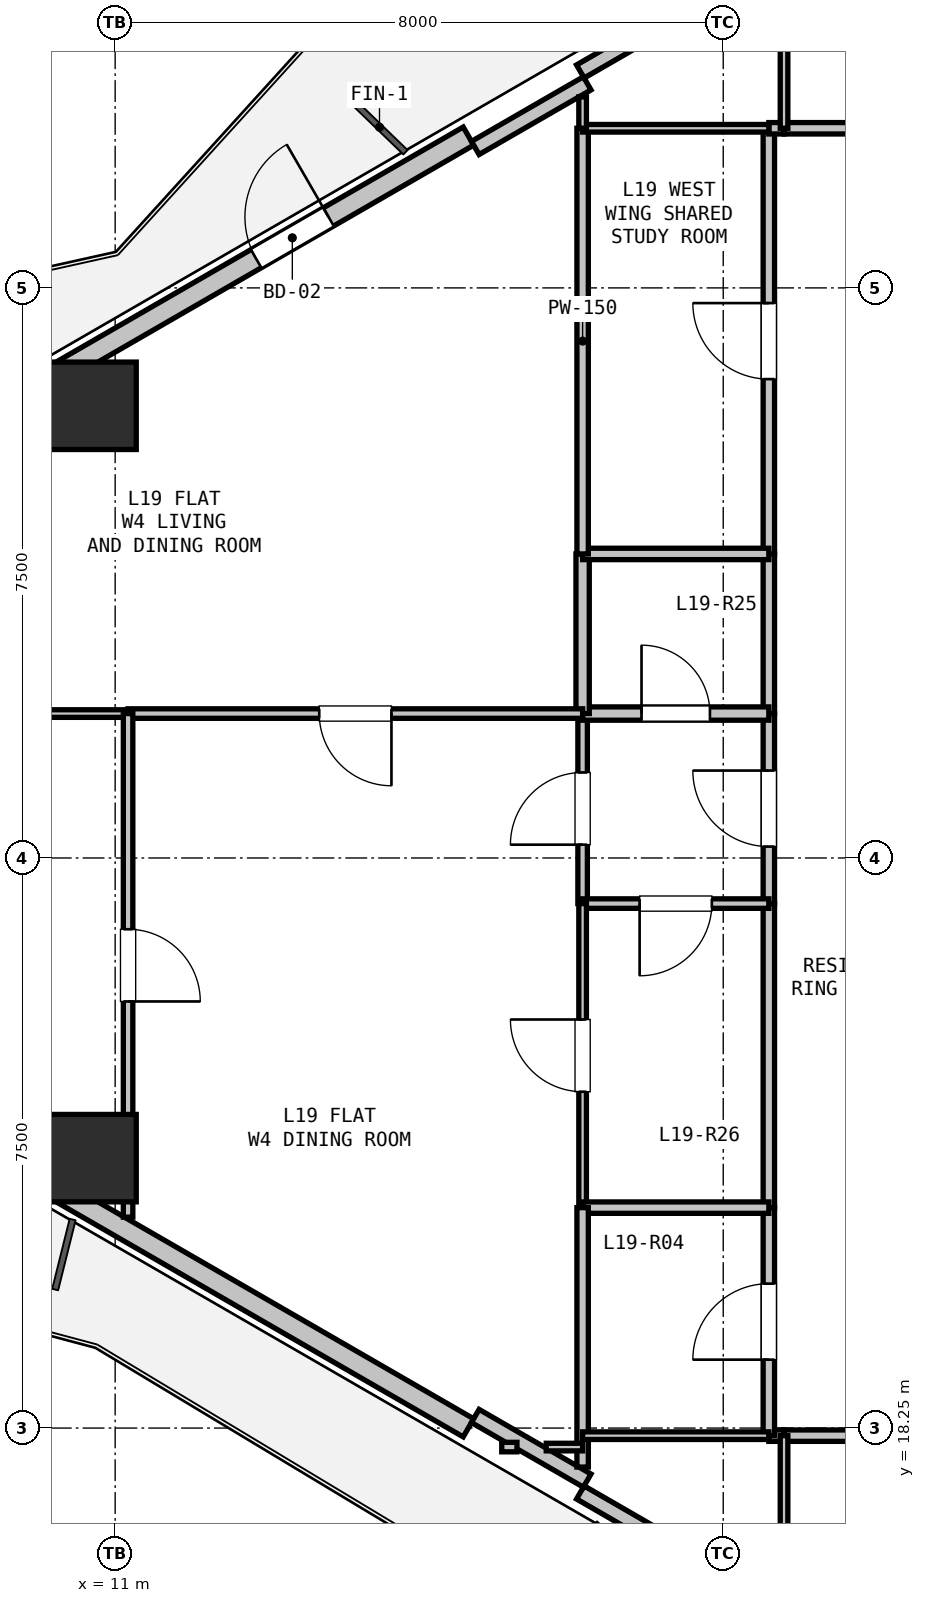
"""IFC4 building model, lengths in metres.
Left out: names, types, materials, properties, quantities, classifications, styles, units other than length and angle.
Written with IfcOpenShell. Run it as: python <this file> out.ifc"""

import sys

from ifc_helpers import new_model, si_unit, direction, frame, frame_2d, origin, origin_2d, place, context, subcontext, project, spatial, rectangle, hollow_rectangle, extrude, element, fill, save


model = new_model("IFC4")
c1 = context("Model", 3, precision=1e-05, world=origin(), true_north=direction((0.0, 1.0)))
c2 = subcontext(c1, "Body", "Model", "MODEL_VIEW")
j1 = project(units=[si_unit("LENGTHUNIT", "METRE"), si_unit("PLANEANGLEUNIT", "RADIAN")], contexts=[c1])
p1 = place(None, origin())
s1 = spatial("IfcSite", under=j1, at=p1, CompositionType="ELEMENT")
p2 = place(p1, origin())
s2 = spatial("IfcBuilding", under=s1, at=p2, CompositionType="ELEMENT")
p3 = place(p2, frame((0.0, 0.0, 73.5)))
s3 = spatial("IfcBuildingStorey", under=s2, at=p3, CompositionType="ELEMENT", Elevation=73.5)
for number, where, z_axis, x_axis in (
    (1, (10.702, 31.699, 0.0), (0.0, 0.0, 1.0), (1.0, 0.0, 0.0)),
    (2, (10.702, 21.801, 0.0), (0.0, 0.0, 1.0), (1.0, 0.0, 0.0)),
):
    element("IfcColumn", number, at=place(p3, frame(where, z_axis=z_axis, x_axis=x_axis)), inside=s3, PredefinedType="COLUMN", context=c2, shape_type="SweptSolid", body=[
        extrude(hollow_rectangle(XDim=1.15, YDim=1.15, WallThickness=0.032, at=origin_2d()), origin(), (0.0, 0.0, 1.0), 3.3),
    ])
p4 = place(p3, frame((5.317, 29.282, 0.0), z_axis=(0.0, 0.0, 1.0), x_axis=(0.866023023012, 0.500004123596, 0.0)))
e3 = element("IfcWall", 3, at=p4, inside=s3, PredefinedType="SOLIDWALL", context=c2, shape_type="SweptSolid", body=[
    extrude(rectangle(XDim=11.93, YDim=0.275, at=frame_2d((5.965, 0.0))), origin(), (0.0, 0.0, 1.0), 2.67),
])
p5 = place(p4, frame((8.704, 0.0, 0.0)))
e4 = element("IfcOpeningElement", 4, at=p5, cuts=e3, PredefinedType="OPENING", context=c2, shape_type="SweptSolid", body=[
    extrude(rectangle(XDim=1.1, YDim=2.1, at=frame_2d((0.55, 1.05))), frame((0.0, 0.147, 0.0), z_axis=(0.0, -1.0, 0.0), x_axis=(1.0, 0.0, 0.0)), (0.0, 0.0, 1.0), 0.295),
])
p6 = place(p3, frame((17.12, 36.097, 0.0), z_axis=(0.0, 0.0, 1.0), x_axis=(0.866027010039, 0.499997217876, 0.0)))
e5 = element("IfcWall", 5, at=p6, inside=s3, PredefinedType="PARAPET", context=c2, shape_type="SweptSolid", body=[
    extrude(rectangle(XDim=11.229, YDim=0.2, at=frame_2d((5.615, 0.0))), origin(), (0.0, 0.0, 1.0), 0.2),
])
p7 = place(p3, frame((15.738, 35.091, 0.0), z_axis=(0.0, 0.0, 1.0), x_axis=(0.866025371046, 0.500000056704, 0.0)))
e6 = element("IfcWall", 6, at=p7, inside=s3, PredefinedType="PARAPET", context=c2, shape_type="SweptSolid", body=[
    extrude(rectangle(XDim=1.7, YDim=0.2, at=frame_2d((0.85, 0.0))), origin(), (0.0, 0.0, 1.0), 2.67),
])
p8 = place(p3, frame((26.845, 11.788, 0.0), z_axis=(0.0, 0.0, 1.0), x_axis=(-0.866027010039, 0.499997217876, 0.0)))
e7 = element("IfcWall", 7, at=p8, inside=s3, PredefinedType="PARAPET", context=c2, shape_type="SweptSolid", body=[
    extrude(rectangle(XDim=11.229, YDim=0.2, at=frame_2d((5.615, 0.0))), origin(), (0.0, 0.0, 1.0), 0.2),
])
p9 = place(p3, frame((15.648, 18.253, 0.0), z_axis=(0.0, 0.0, 1.0), x_axis=(-0.866023023012, 0.500004123596, 0.0)))
e8 = element("IfcWall", 8, at=p9, inside=s3, PredefinedType="SOLIDWALL", context=c2, shape_type="SweptSolid", body=[
    extrude(rectangle(XDim=11.93, YDim=0.275, at=frame_2d((5.965, 0.0))), origin(), (0.0, 0.0, 1.0), 2.67),
])
p10 = place(p9, frame((8.021, 0.0, 0.9)))
e9 = element("IfcOpeningElement", 9, at=p10, cuts=e8, PredefinedType="OPENING", context=c2, shape_type="SweptSolid", body=[
    extrude(rectangle(XDim=1.2, YDim=1.4, at=frame_2d((0.6, 0.7))), frame((0.0, 0.147, 0.0), z_axis=(0.0, -1.0, 0.0), x_axis=(1.0, 0.0, 0.0)), (0.0, 0.0, 1.0), 0.295),
])
p11 = place(p3, frame((17.21, 17.559, 0.0), z_axis=(0.0, 0.0, 1.0), x_axis=(-0.866025371046, 0.500000056704, 0.0)))
e10 = element("IfcWall", 10, at=p11, inside=s3, PredefinedType="PARAPET", context=c2, shape_type="SweptSolid", body=[
    extrude(rectangle(XDim=1.7, YDim=0.2, at=frame_2d((0.85, 0.0))), origin(), (0.0, 0.0, 1.0), 2.67),
])
p12 = place(p3, frame((22.6, 18.15, 0.0), z_axis=(0.0, 0.0, 1.0), x_axis=(-1.0, 0.0, 0.0)))
e11 = element("IfcWall", 11, at=p12, inside=s3, PredefinedType="PARTITIONING", context=c2, shape_type="SweptSolid", body=[
    extrude(rectangle(XDim=2.8, YDim=0.15, at=frame_2d((1.4, 0.0))), origin(), (0.0, 0.0, 1.0), 3.05),
])
p13 = place(p12, frame((0.9, 0.0, 0.0)))
e12 = element("IfcOpeningElement", 12, at=p13, cuts=e11, PredefinedType="OPENING", context=c2, shape_type="SweptSolid", body=[
    extrude(rectangle(XDim=1.0, YDim=2.15, at=frame_2d((0.5, 1.075))), frame((0.0, 0.085, 0.0), z_axis=(0.0, -1.0, 0.0), x_axis=(1.0, 0.0, 0.0)), (0.0, 0.0, 1.0), 0.17),
])
p14 = place(p3, frame((19.8, 18.15, 0.0), z_axis=(0.0, 0.0, 1.0), x_axis=(-1.0, 0.0, 0.0)))
e13 = element("IfcWall", 13, at=p14, inside=s3, PredefinedType="PARTITIONING", context=c2, shape_type="SweptSolid", body=[
    extrude(rectangle(XDim=0.2, YDim=0.15, at=frame_2d((0.1, 0.0))), origin(), (0.0, 0.0, 1.0), 3.05),
])
p15 = place(p3, frame((19.6, 18.15, 0.0), z_axis=(0.0, 0.0, 1.0), x_axis=(0.0, 1.0, 0.0)))
e14 = element("IfcWall", 14, at=p15, inside=s3, PredefinedType="PARTITIONING", context=c2, shape_type="SweptSolid", body=[
    extrude(rectangle(XDim=3.0, YDim=0.15, at=frame_2d((1.5, 0.0))), origin(), (0.0, 0.0, 1.0), 2.423),
])
p16 = place(p15, frame((1.0, 0.0, 0.0)))
e15 = element("IfcOpeningElement", 15, at=p16, cuts=e14, PredefinedType="OPENING", context=c2, shape_type="SweptSolid", body=[
    extrude(rectangle(XDim=1.0, YDim=2.15, at=frame_2d((0.5, 1.075))), frame((0.0, 0.085, 0.0), z_axis=(0.0, -1.0, 0.0), x_axis=(1.0, 0.0, 0.0)), (0.0, 0.0, 1.0), 0.17),
])
p17 = place(p3, frame((19.6, 21.15, 0.0), z_axis=(0.0, 0.0, 1.0), x_axis=(0.0, 1.0, 0.0)))
e16 = element("IfcWall", 16, at=p17, inside=s3, PredefinedType="PARTITIONING", context=c2, shape_type="SweptSolid", body=[
    extrude(rectangle(XDim=4.0, YDim=0.15, at=frame_2d((2.0, 0.0))), origin(), (0.0, 0.0, 1.0), 2.423),
])
p18 = place(p3, frame((19.6, 25.15, 0.0), z_axis=(0.0, 0.0, 1.0), x_axis=(0.0, 1.0, 0.0)))
e17 = element("IfcWall", 17, at=p18, inside=s3, PredefinedType="PARTITIONING", context=c2, shape_type="SweptSolid", body=[
    extrude(rectangle(XDim=2.5, YDim=0.15, at=frame_2d((1.25, 0.0))), origin(), (0.0, 0.0, 1.0), 3.05),
])
p19 = place(p18, frame((0.75, 0.0, 0.0)))
e18 = element("IfcOpeningElement", 18, at=p19, cuts=e17, PredefinedType="OPENING", context=c2, shape_type="SweptSolid", body=[
    extrude(rectangle(XDim=1.0, YDim=2.15, at=frame_2d((0.5, 1.075))), frame((0.0, 0.085, 0.0), z_axis=(0.0, -1.0, 0.0), x_axis=(1.0, 0.0, 0.0)), (0.0, 0.0, 1.0), 0.17),
])
p20 = place(p3, frame((19.6, 27.65, 0.0), z_axis=(0.0, 0.0, 1.0), x_axis=(0.0, 1.0, 0.0)))
e19 = element("IfcWall", 19, at=p20, inside=s3, PredefinedType="PARTITIONING", context=c2, shape_type="SweptSolid", body=[
    extrude(rectangle(XDim=2.1, YDim=0.15, at=frame_2d((1.05, 0.0))), origin(), (0.0, 0.0, 1.0), 3.05),
])
p21 = place(p3, frame((19.6, 29.75, 0.0), z_axis=(0.0, 0.0, 1.0), x_axis=(0.0, 1.0, 0.0)))
e20 = element("IfcWall", 20, at=p21, inside=s3, PredefinedType="PARTITIONING", context=c2, shape_type="SweptSolid", body=[
    extrude(rectangle(XDim=5.6, YDim=0.15, at=frame_2d((2.8, 0.0))), origin(), (0.0, 0.0, 1.0), 2.423),
])
p22 = place(p21, frame((2.3, 0.0, 0.0)))
e21 = element("IfcOpeningElement", 21, at=p22, cuts=e20, PredefinedType="OPENING", context=c2, shape_type="SweptSolid", body=[
    extrude(rectangle(XDim=1.0, YDim=2.15, at=frame_2d((0.5, 1.075))), frame((0.0, 0.085, 0.0), z_axis=(0.0, -1.0, 0.0), x_axis=(1.0, 0.0, 0.0)), (0.0, 0.0, 1.0), 0.17),
])
p23 = place(p3, frame((19.6, 35.35, 0.0), z_axis=(0.0, 0.0, 1.0), x_axis=(1.0, 0.0, 0.0)))
e22 = element("IfcWall", 22, at=p23, inside=s3, PredefinedType="PARTITIONING", context=c2, shape_type="SweptSolid", body=[
    extrude(rectangle(XDim=0.2, YDim=0.15, at=frame_2d((0.1, 0.0))), origin(), (0.0, 0.0, 1.0), 3.05),
])
p24 = place(p3, frame((19.8, 35.35, 0.0), z_axis=(0.0, 0.0, 1.0), x_axis=(1.0, 0.0, 0.0)))
e23 = element("IfcWall", 23, at=p24, inside=s3, PredefinedType="PARTITIONING", context=c2, shape_type="SweptSolid", body=[
    extrude(rectangle(XDim=5.2, YDim=0.15, at=frame_2d((2.6, 0.0))), origin(), (0.0, 0.0, 1.0), 3.05),
])
p25 = place(p24, frame((2.672, 0.0, 0.0)))
e24 = element("IfcOpeningElement", 24, at=p25, cuts=e23, PredefinedType="OPENING", context=c2, shape_type="SweptSolid", body=[
    extrude(rectangle(XDim=1.8, YDim=2.2, at=frame_2d((0.9, 1.1))), frame((0.0, 0.085, 0.0), z_axis=(0.0, -1.0, 0.0), x_axis=(1.0, 0.0, 0.0)), (0.0, 0.0, 1.0), 0.17),
])
p26 = place(p3, frame((17.15, 25.15, 0.0), z_axis=(0.0, 0.0, 1.0), x_axis=(0.0, 1.0, 0.0)))
e25 = element("IfcWall", 25, at=p26, inside=s3, PredefinedType="PARTITIONING", context=c2, shape_type="SweptSolid", body=[
    extrude(rectangle(XDim=2.5, YDim=0.125, at=frame_2d((1.25, 0.0))), origin(), (0.0, 0.0, 1.0), 3.05),
])
p27 = place(p26, frame((0.775, 0.0, 0.0)))
e26 = element("IfcOpeningElement", 26, at=p27, cuts=e25, PredefinedType="OPENING", context=c2, shape_type="SweptSolid", body=[
    extrude(rectangle(XDim=0.95, YDim=2.1, at=frame_2d((0.475, 1.05))), frame((0.0, 0.073, 0.0), z_axis=(0.0, -1.0, 0.0), x_axis=(1.0, 0.0, 0.0)), (0.0, 0.0, 1.0), 0.145),
])
p28 = place(p3, frame((17.15, 27.65, 0.0), z_axis=(0.0, 0.0, 1.0), x_axis=(1.0, 0.0, 0.0)))
e27 = element("IfcWall", 27, at=p28, inside=s3, PredefinedType="PLUMBINGWALL", context=c2, shape_type="SweptSolid", body=[
    extrude(rectangle(XDim=2.45, YDim=0.175, at=frame_2d((1.225, 0.0))), origin(), (0.0, 0.0, 1.0), 3.05),
])
p29 = place(p28, frame((0.775, 0.0, 0.0)))
e28 = element("IfcOpeningElement", 28, at=p29, cuts=e27, PredefinedType="OPENING", context=c2, shape_type="SweptSolid", body=[
    extrude(rectangle(XDim=0.9, YDim=2.1, at=frame_2d((0.45, 1.05))), frame((0.0, 0.097, 0.0), z_axis=(0.0, -1.0, 0.0), x_axis=(1.0, 0.0, 0.0)), (0.0, 0.0, 1.0), 0.195),
])
p30 = place(p3, frame((19.6, 25.15, 0.0), z_axis=(0.0, 0.0, 1.0), x_axis=(-1.0, 0.0, 0.0)))
e29 = element("IfcWall", 29, at=p30, inside=s3, PredefinedType="PARTITIONING", context=c2, shape_type="SweptSolid", body=[
    extrude(rectangle(XDim=2.45, YDim=0.125, at=frame_2d((1.225, 0.0))), origin(), (0.0, 0.0, 1.0), 3.05),
])
p31 = place(p30, frame((0.75, 0.0, 0.0)))
e30 = element("IfcOpeningElement", 30, at=p31, cuts=e29, PredefinedType="OPENING", context=c2, shape_type="SweptSolid", body=[
    extrude(rectangle(XDim=0.95, YDim=2.1, at=frame_2d((0.475, 1.05))), frame((0.0, 0.073, 0.0), z_axis=(0.0, -1.0, 0.0), x_axis=(1.0, 0.0, 0.0)), (0.0, 0.0, 1.0), 0.145),
])
p32 = place(p3, frame((17.15, 27.65, 0.0), z_axis=(0.0, 0.0, 1.0), x_axis=(0.0, 1.0, 0.0)))
e31 = element("IfcWall", 31, at=p32, inside=s3, PredefinedType="PLUMBINGWALL", context=c2, shape_type="SweptSolid", body=[
    extrude(rectangle(XDim=2.1, YDim=0.175, at=frame_2d((1.05, 0.0))), origin(), (0.0, 0.0, 1.0), 3.05),
])
p33 = place(p3, frame((17.15, 29.75, 0.0), z_axis=(0.0, 0.0, 1.0), x_axis=(1.0, 0.0, 0.0)))
e32 = element("IfcWall", 32, at=p33, inside=s3, PredefinedType="PARTITIONING", context=c2, shape_type="SweptSolid", body=[
    extrude(rectangle(XDim=2.45, YDim=0.15, at=frame_2d((1.225, 0.0))), origin(), (0.0, 0.0, 1.0), 3.05),
])
p34 = place(p3, frame((17.15, 21.15, 0.0), z_axis=(0.0, 0.0, 1.0), x_axis=(0.0, 1.0, 0.0)))
e33 = element("IfcWall", 33, at=p34, inside=s3, PredefinedType="PARTITIONING", context=c2, shape_type="SweptSolid", body=[
    extrude(rectangle(XDim=4.0, YDim=0.1, at=frame_2d((2.0, 0.0))), origin(), (0.0, 0.0, 1.0), 2.423),
])
p35 = place(p34, frame((1.525, 0.0, 0.0)))
e34 = element("IfcOpeningElement", 34, at=p35, cuts=e33, PredefinedType="OPENING", context=c2, shape_type="SweptSolid", body=[
    extrude(rectangle(XDim=0.95, YDim=2.1, at=frame_2d((0.475, 1.05))), frame((0.0, 0.06, 0.0), z_axis=(0.0, -1.0, 0.0), x_axis=(1.0, 0.0, 0.0)), (0.0, 0.0, 1.0), 0.12),
])
p36 = place(p3, frame((19.6, 21.15, 0.0), z_axis=(0.0, 0.0, 1.0), x_axis=(-1.0, 0.0, 0.0)))
e35 = element("IfcWall", 35, at=p36, inside=s3, PredefinedType="PARTITIONING", context=c2, shape_type="SweptSolid", body=[
    extrude(rectangle(XDim=2.45, YDim=0.15, at=frame_2d((1.225, 0.0))), origin(), (0.0, 0.0, 1.0), 2.423),
])
p37 = place(p3, frame((19.8, 35.35, 0.0), z_axis=(0.0, 0.0, 1.0), x_axis=(0.0, 1.0, 0.0)))
e36 = element("IfcWall", 36, at=p37, inside=s3, PredefinedType="PARTITIONING", context=c2, shape_type="SweptSolid", body=[
    extrude(rectangle(XDim=2.252, YDim=0.1, at=frame_2d((1.126, 0.0))), origin(), (0.0, 0.0, 1.0), 2.365),
])
p38 = place(p3, frame((17.15, 29.75, 0.0), z_axis=(0.0, 0.0, 1.0), x_axis=(0.0, 1.0, 0.0)))
e37 = element("IfcWall", 37, at=p38, inside=s3, PredefinedType="PARTITIONING", context=c2, shape_type="SweptSolid", body=[
    extrude(rectangle(XDim=5.6, YDim=0.15, at=frame_2d((2.8, 0.0))), origin(), (0.0, 0.0, 1.0), 2.365),
])
p39 = place(p3, frame((17.15, 35.35, 0.0), z_axis=(0.0, 0.0, 1.0), x_axis=(1.0, 0.0, 0.0)))
e38 = element("IfcWall", 38, at=p39, inside=s3, PredefinedType="PARTITIONING", context=c2, shape_type="SweptSolid", body=[
    extrude(rectangle(XDim=2.45, YDim=0.1, at=frame_2d((1.225, 0.0))), origin(), (0.0, 0.0, 1.0), 2.365),
])
p40 = place(p3, frame((17.15, 17.737, 0.0), z_axis=(0.0, 0.0, 1.0), x_axis=(0.0, 1.0, 0.0)))
e39 = element("IfcWall", 39, at=p40, inside=s3, PredefinedType="PARTITIONING", context=c2, shape_type="SweptSolid", body=[
    extrude(rectangle(XDim=3.413, YDim=0.15, at=frame_2d((1.707, 0.0))), origin(), (0.0, 0.0, 1.0), 2.365),
])
p41 = place(p3, frame((19.6, 18.15, 0.0), z_axis=(0.0, 0.0, 1.0), x_axis=(-1.0, 0.0, 0.0)))
e40 = element("IfcWall", 40, at=p41, inside=s3, PredefinedType="PARTITIONING", context=c2, shape_type="SweptSolid", body=[
    extrude(rectangle(XDim=2.45, YDim=0.1, at=frame_2d((1.225, 0.0))), origin(), (0.0, 0.0, 1.0), 2.365),
])
p42 = place(p3, frame((19.8, 15.897, 0.0), z_axis=(0.0, 0.0, 1.0), x_axis=(0.0, 1.0, 0.0)))
e41 = element("IfcWall", 41, at=p42, inside=s3, PredefinedType="PARTITIONING", context=c2, shape_type="SweptSolid", body=[
    extrude(rectangle(XDim=2.252, YDim=0.1, at=frame_2d((1.126, 0.0))), origin(), (0.0, 0.0, 1.0), 2.365),
])
p43 = place(p3, frame((17.15, 35.763, 0.0), z_axis=(0.0, 0.0, 1.0), x_axis=(0.0, -1.0, 0.0)))
e42 = element("IfcWall", 42, at=p43, inside=s3, PredefinedType="PARTITIONING", context=c2, shape_type="SweptSolid", body=[
    extrude(rectangle(XDim=0.413, YDim=0.1, at=frame_2d((0.207, 0.0))), origin(), (0.0, 0.0, 1.0), 2.365),
])
p44 = place(p3, frame((17.15, 27.65, 0.0), z_axis=(0.0, 0.0, 1.0), x_axis=(-1.0, 0.0, 0.0)))
e43 = element("IfcWall", 43, at=p44, inside=s3, PredefinedType="PARTITIONING", context=c2, shape_type="SweptSolid", body=[
    extrude(rectangle(XDim=5.98, YDim=0.125, at=frame_2d((2.99, 0.0))), origin(), (0.0, 0.0, 1.0), 3.05),
])
p45 = place(p44, frame((2.515, 0.0, 0.0)))
e44 = element("IfcOpeningElement", 44, at=p45, cuts=e43, PredefinedType="OPENING", context=c2, shape_type="SweptSolid", body=[
    extrude(rectangle(XDim=0.95, YDim=2.1, at=frame_2d((0.475, 1.05))), frame((0.0, 0.073, 0.0), z_axis=(0.0, -1.0, 0.0), x_axis=(1.0, 0.0, 0.0)), (0.0, 0.0, 1.0), 0.145),
])
p46 = place(p3, frame((11.17, 27.65, 0.0), z_axis=(0.0, 0.0, 1.0), x_axis=(-1.0, 0.0, 0.0)))
e45 = element("IfcWall", 45, at=p46, inside=s3, PredefinedType="PARTITIONING", context=c2, shape_type="SweptSolid", body=[
    extrude(rectangle(XDim=5.822, YDim=0.1, at=frame_2d((2.911, 0.0))), origin(), (0.0, 0.0, 1.0), 2.66),
])
p47 = place(p46, frame((2.436, 0.0, 0.0)))
e46 = element("IfcOpeningElement", 46, at=p47, cuts=e45, PredefinedType="OPENING", context=c2, shape_type="SweptSolid", body=[
    extrude(rectangle(XDim=0.95, YDim=2.1, at=frame_2d((0.475, 1.05))), frame((0.0, 0.06, 0.0), z_axis=(0.0, -1.0, 0.0), x_axis=(1.0, 0.0, 0.0)), (0.0, 0.0, 1.0), 0.12),
])
p48 = place(p3, frame((11.17, 27.65, 0.0), z_axis=(0.0, 0.0, 1.0), x_axis=(0.0, -1.0, 0.0)))
e47 = element("IfcWall", 47, at=p48, inside=s3, PredefinedType="PARTITIONING", context=c2, shape_type="SweptSolid", body=[
    extrude(rectangle(XDim=6.625, YDim=0.125, at=frame_2d((3.312, 0.0))), origin(), (0.0, 0.0, 1.0), 2.365),
])
p49 = place(p48, frame((2.838, 0.0, 0.0)))
e48 = element("IfcOpeningElement", 48, at=p49, cuts=e47, PredefinedType="OPENING", context=c2, shape_type="SweptSolid", body=[
    extrude(rectangle(XDim=0.95, YDim=2.1, at=frame_2d((0.475, 1.05))), frame((0.0, 0.073, 0.0), z_axis=(0.0, -1.0, 0.0), x_axis=(1.0, 0.0, 0.0)), (0.0, 0.0, 1.0), 0.145),
])
p50 = place(p3, frame((17.15, 18.0, 0.0), z_axis=(0.0, 0.0, 1.0), x_axis=(-1.0, 0.0, 0.0)))
e49 = element("IfcWall", 49, at=p50, inside=s3, PredefinedType="PARTITIONING", context=c2, shape_type="SweptSolid", body=[
    extrude(rectangle(XDim=0.478, YDim=0.1, at=frame_2d((0.239, 0.0))), origin(), (0.0, 0.0, 1.0), 2.365),
])
p51 = place(p3, frame((16.286, 18.0, 0.0), z_axis=(0.0, 0.0, 1.0), x_axis=(-1.0, 0.0, 0.0)))
e50 = element("IfcWall", 50, at=p51, inside=s3, PredefinedType="PARTITIONING", context=c2, shape_type="SweptSolid", body=[
    extrude(rectangle(XDim=0.2, YDim=0.125, at=frame_2d((0.1, 0.0))), origin(), (0.0, 0.0, 1.0), 3.05),
])
p52 = place(p5, origin())
e51 = element("IfcDoor", 51, at=p52, inside=s3, OperationType="SINGLE_SWING_RIGHT", PredefinedType="DOOR", context=c2, shape_type="SweptSolid", body=[
    extrude(rectangle(XDim=1.1, YDim=2.1, at=frame_2d((0.55, 1.05))), frame((0.0, 0.025, 0.0), z_axis=(0.0, -1.0, 0.0), x_axis=(1.0, 0.0, 0.0)), (0.0, 0.0, 1.0), 0.05),
])
fill(e4, e51)
p53 = place(p19, origin())
e52 = element("IfcDoor", 52, at=p53, inside=s3, OperationType="SINGLE_SWING_RIGHT", PredefinedType="DOOR", context=c2, shape_type="SweptSolid", body=[
    extrude(rectangle(XDim=1.0, YDim=2.15, at=frame_2d((0.5, 1.075))), frame((0.0, 0.025, 0.0), z_axis=(0.0, -1.0, 0.0), x_axis=(1.0, 0.0, 0.0)), (0.0, 0.0, 1.0), 0.05),
])
fill(e18, e52)
p54 = place(p22, origin())
e53 = element("IfcDoor", 53, at=p54, inside=s3, OperationType="SINGLE_SWING_RIGHT", PredefinedType="DOOR", context=c2, shape_type="SweptSolid", body=[
    extrude(rectangle(XDim=1.0, YDim=2.15, at=frame_2d((0.5, 1.075))), frame((0.0, 0.025, 0.0), z_axis=(0.0, -1.0, 0.0), x_axis=(1.0, 0.0, 0.0)), (0.0, 0.0, 1.0), 0.05),
])
fill(e21, e53)
p55 = place(p16, origin())
e54 = element("IfcDoor", 54, at=p55, inside=s3, OperationType="SINGLE_SWING_LEFT", PredefinedType="DOOR", context=c2, shape_type="SweptSolid", body=[
    extrude(rectangle(XDim=1.0, YDim=2.15, at=frame_2d((0.5, 1.075))), frame((0.0, 0.025, 0.0), z_axis=(0.0, -1.0, 0.0), x_axis=(1.0, 0.0, 0.0)), (0.0, 0.0, 1.0), 0.05),
])
fill(e15, e54)
p56 = place(p29, origin())
e55 = element("IfcDoor", 55, at=p56, inside=s3, OperationType="SINGLE_SWING_LEFT", PredefinedType="DOOR", context=c2, shape_type="SweptSolid", body=[
    extrude(rectangle(XDim=0.9, YDim=2.1, at=frame_2d((0.45, 1.05))), frame((0.0, 0.025, 0.0), z_axis=(0.0, -1.0, 0.0), x_axis=(1.0, 0.0, 0.0)), (0.0, 0.0, 1.0), 0.05),
])
fill(e28, e55)
p57 = place(p31, origin())
e56 = element("IfcDoor", 56, at=p57, inside=s3, OperationType="SINGLE_SWING_RIGHT", PredefinedType="DOOR", context=c2, shape_type="SweptSolid", body=[
    extrude(rectangle(XDim=0.95, YDim=2.1, at=frame_2d((0.475, 1.05))), frame((0.0, 0.025, 0.0), z_axis=(0.0, -1.0, 0.0), x_axis=(1.0, 0.0, 0.0)), (0.0, 0.0, 1.0), 0.05),
])
fill(e30, e56)
p58 = place(p27, origin())
e57 = element("IfcDoor", 57, at=p58, inside=s3, OperationType="SINGLE_SWING_LEFT", PredefinedType="DOOR", context=c2, shape_type="SweptSolid", body=[
    extrude(rectangle(XDim=0.95, YDim=2.1, at=frame_2d((0.475, 1.05))), frame((0.0, 0.025, 0.0), z_axis=(0.0, -1.0, 0.0), x_axis=(1.0, 0.0, 0.0)), (0.0, 0.0, 1.0), 0.05),
])
fill(e26, e57)
p59 = place(p35, origin())
e58 = element("IfcDoor", 58, at=p59, inside=s3, OperationType="SINGLE_SWING_RIGHT", PredefinedType="DOOR", context=c2, shape_type="SweptSolid", body=[
    extrude(rectangle(XDim=0.95, YDim=2.1, at=frame_2d((0.475, 1.05))), frame((0.0, 0.025, 0.0), z_axis=(0.0, -1.0, 0.0), x_axis=(1.0, 0.0, 0.0)), (0.0, 0.0, 1.0), 0.05),
])
fill(e34, e58)
p60 = place(p45, origin())
e59 = element("IfcDoor", 59, at=p60, inside=s3, OperationType="SINGLE_SWING_LEFT", PredefinedType="DOOR", context=c2, shape_type="SweptSolid", body=[
    extrude(rectangle(XDim=0.95, YDim=2.1, at=frame_2d((0.475, 1.05))), frame((0.0, 0.025, 0.0), z_axis=(0.0, -1.0, 0.0), x_axis=(1.0, 0.0, 0.0)), (0.0, 0.0, 1.0), 0.05),
])
fill(e44, e59)
p61 = place(p49, origin())
e60 = element("IfcDoor", 60, at=p61, inside=s3, OperationType="SINGLE_SWING_RIGHT", PredefinedType="DOOR", context=c2, shape_type="SweptSolid", body=[
    extrude(rectangle(XDim=0.95, YDim=2.1, at=frame_2d((0.475, 1.05))), frame((0.0, 0.025, 0.0), z_axis=(0.0, -1.0, 0.0), x_axis=(1.0, 0.0, 0.0)), (0.0, 0.0, 1.0), 0.05),
])
fill(e48, e60)
save(model, sys.argv[1])
